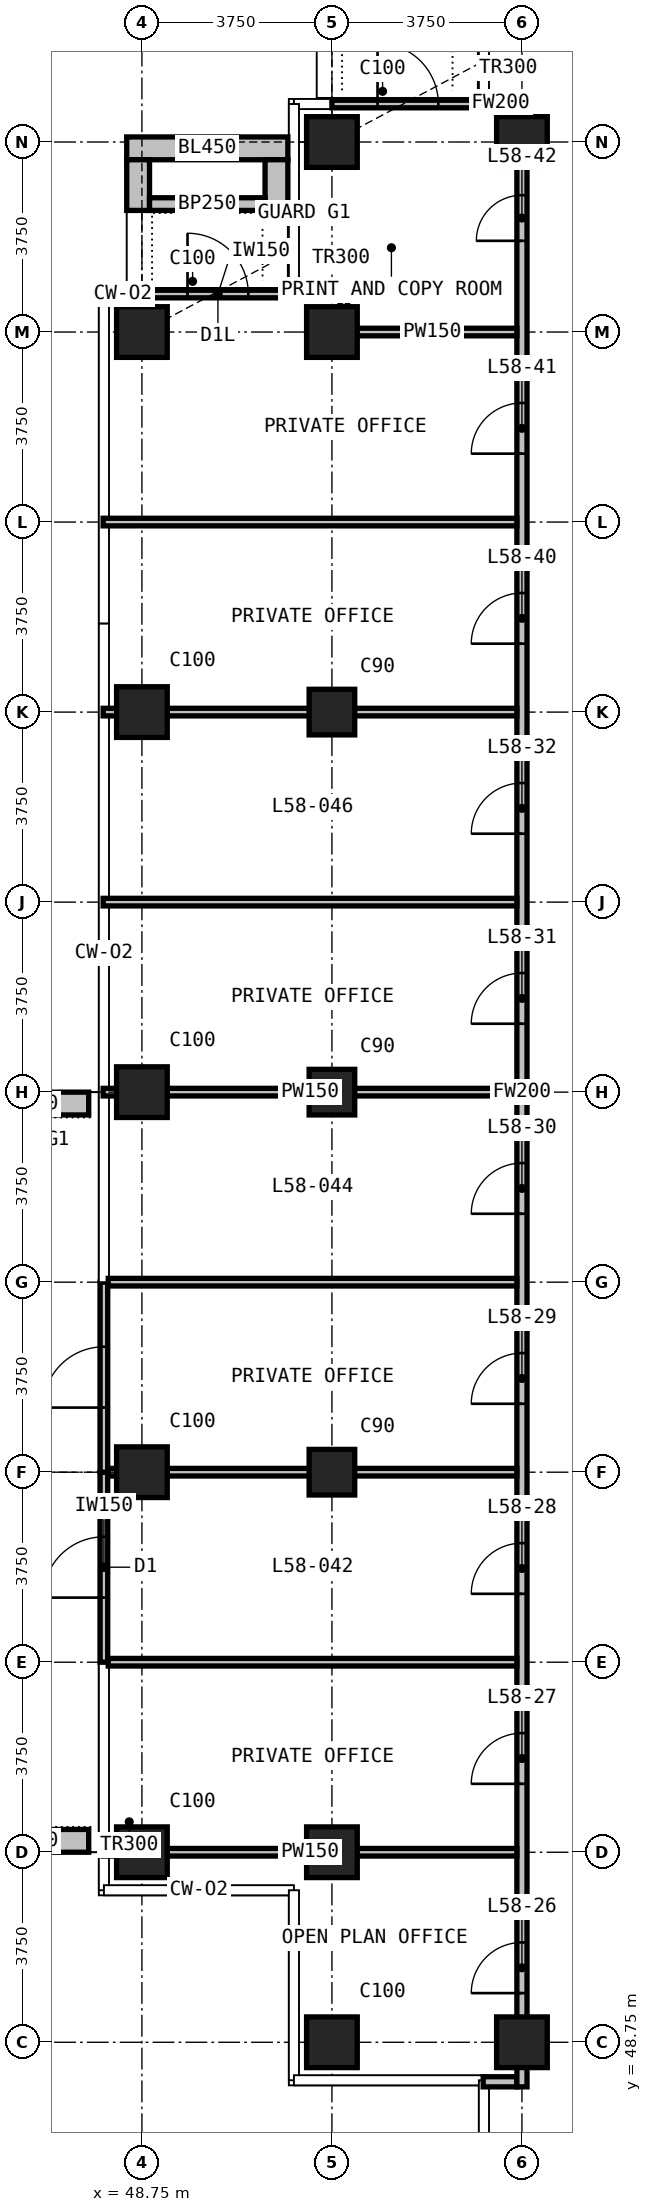
"""IFC4 building model, lengths in metres.
Left out: names, types, materials, properties, quantities, classifications, styles, units other than length and angle.
Written with IfcOpenShell. Run it as: python <this file> out.ifc"""

import sys

from ifc_helpers import new_model, si_unit, direction, frame, frame_2d, origin, origin_2d, place, context, subcontext, project, spatial, rectangle, extrude, element, fill, save


model = new_model("IFC4")
c1 = context("Model", 3, precision=1e-05, world=origin(), true_north=direction((0.0, 1.0)))
c2 = subcontext(c1, "Body", "Model", "MODEL_VIEW")
j1 = project(units=[si_unit("LENGTHUNIT", "METRE"), si_unit("PLANEANGLEUNIT", "RADIAN")], contexts=[c1])
p1 = place(None, origin())
s1 = spatial("IfcSite", under=j1, at=p1, CompositionType="ELEMENT")
p2 = place(p1, origin())
s2 = spatial("IfcBuilding", under=s1, at=p2, CompositionType="ELEMENT")
p3 = place(p2, frame((0.0, 0.0, 224.7)))
s3 = spatial("IfcBuildingStorey", under=s2, at=p3, CompositionType="ELEMENT", Elevation=224.7)
for number, where, z_axis, x_axis in (
    (1, (48.75, 52.5, 0.0), (0.0, 0.0, 1.0), (1.0, 0.0, 0.0)),
    (2, (48.75, 60.0, 0.0), (0.0, 0.0, 1.0), (1.0, 0.0, 0.0)),
    (3, (48.75, 67.5, 0.0), (0.0, 0.0, 1.0), (1.0, 0.0, 0.0)),
    (4, (48.75, 75.0, 0.0), (0.0, 0.0, 1.0), (1.0, 0.0, 0.0)),
    (5, (48.75, 82.5, 0.0), (0.0, 0.0, 1.0), (1.0, 0.0, 0.0)),
    (6, (52.5, 48.75, 0.0), (0.0, 0.0, 1.0), (1.0, 0.0, 0.0)),
    (7, (52.5, 52.5, 0.0), (0.0, 0.0, 1.0), (1.0, 0.0, 0.0)),
):
    element("IfcColumn", number, at=place(p3, frame(where, z_axis=z_axis, x_axis=x_axis)), inside=s3, PredefinedType="COLUMN", context=c2, shape_type="SweptSolid", body=[
        extrude(rectangle(XDim=1.0, YDim=1.0, at=origin_2d()), origin(), (0.0, 0.0, 1.0), 3.6),
    ])
for number, where, z_axis, x_axis in (
    (8, (52.5, 60.0, 0.0), (0.0, 0.0, 1.0), (1.0, 0.0, 0.0)),
    (9, (52.5, 67.5, 0.0), (0.0, 0.0, 1.0), (1.0, 0.0, 0.0)),
    (10, (52.5, 75.0, 0.0), (0.0, 0.0, 1.0), (1.0, 0.0, 0.0)),
):
    element("IfcColumn", number, at=place(p3, frame(where, z_axis=z_axis, x_axis=x_axis)), inside=s3, PredefinedType="COLUMN", context=c2, shape_type="SweptSolid", body=[
        extrude(rectangle(XDim=0.9, YDim=0.9, at=origin_2d()), origin(), (0.0, 0.0, 1.0), 3.6),
    ])
for number, where, z_axis, x_axis in (
    (11, (52.5, 82.5, 0.0), (0.0, 0.0, 1.0), (1.0, 0.0, 0.0)),
    (12, (52.5, 86.25, 0.0), (0.0, 0.0, 1.0), (1.0, 0.0, 0.0)),
    (13, (56.25, 48.75, 0.0), (0.0, 0.0, 1.0), (1.0, 0.0, 0.0)),
    (14, (56.25, 86.25, 0.0), (0.0, 0.0, 1.0), (1.0, 0.0, 0.0)),
):
    element("IfcColumn", number, at=place(p3, frame(where, z_axis=z_axis, x_axis=x_axis)), inside=s3, PredefinedType="COLUMN", context=c2, shape_type="SweptSolid", body=[
        extrude(rectangle(XDim=1.0, YDim=1.0, at=origin_2d()), origin(), (0.0, 0.0, 1.0), 3.6),
    ])
p4 = place(p3, frame((52.5, 87.0, 0.0), z_axis=(0.0, 0.0, 1.0), x_axis=(1.0, 0.0, 0.0)))
e15 = element("IfcWall", 15, at=p4, inside=s3, PredefinedType="SOLIDWALL", context=c2, shape_type="SweptSolid", body=[
    extrude(rectangle(XDim=3.0, YDim=0.15, at=frame_2d((1.5, 0.0))), origin(), (0.0, 0.0, 1.0), 3.3),
])
p5 = place(p4, frame((0.9, 0.0, 0.0)))
e16 = element("IfcOpeningElement", 16, at=p5, cuts=e15, PredefinedType="OPENING", context=c2, shape_type="SweptSolid", body=[
    extrude(rectangle(XDim=1.2, YDim=2.0, at=frame_2d((0.6, 1.0))), frame((0.0, 0.085, 0.0), z_axis=(0.0, -1.0, 0.0), x_axis=(1.0, 0.0, 0.0)), (0.0, 0.0, 1.0), 0.17),
])
p6 = place(p3, frame((48.75, 83.25, 0.0), z_axis=(0.0, 0.0, 1.0), x_axis=(1.0, 0.0, 0.0)))
e17 = element("IfcWall", 17, at=p6, inside=s3, PredefinedType="SOLIDWALL", context=c2, shape_type="SweptSolid", body=[
    extrude(rectangle(XDim=3.0, YDim=0.15, at=frame_2d((1.5, 0.0))), origin(), (0.0, 0.0, 1.0), 3.3),
])
p7 = place(p6, frame((0.9, 0.0, 0.0)))
e18 = element("IfcOpeningElement", 18, at=p7, cuts=e17, PredefinedType="OPENING", context=c2, shape_type="SweptSolid", body=[
    extrude(rectangle(XDim=1.2, YDim=2.0, at=frame_2d((0.6, 1.0))), frame((0.0, 0.085, 0.0), z_axis=(0.0, -1.0, 0.0), x_axis=(1.0, 0.0, 0.0)), (0.0, 0.0, 1.0), 0.17),
])
p8 = place(p3, frame((48.0, 56.25, 0.0), z_axis=(0.0, 0.0, 1.0), x_axis=(0.0, 1.0, 0.0)))
e19 = element("IfcWall", 19, at=p8, inside=s3, PredefinedType="SOLIDWALL", context=c2, shape_type="SweptSolid", body=[
    extrude(rectangle(XDim=3.75, YDim=0.15, at=frame_2d((1.875, 0.0))), origin(), (0.0, 0.0, 1.0), 3.3),
])
p9 = place(p8, frame((1.275, 0.0, 0.0)))
e20 = element("IfcOpeningElement", 20, at=p9, cuts=e19, PredefinedType="OPENING", context=c2, shape_type="SweptSolid", body=[
    extrude(rectangle(XDim=1.2, YDim=2.4, at=frame_2d((0.6, 1.2))), frame((0.0, 0.085, 0.0), z_axis=(0.0, -1.0, 0.0), x_axis=(1.0, 0.0, 0.0)), (0.0, 0.0, 1.0), 0.17),
])
p10 = place(p3, frame((48.0, 60.0, 0.0), z_axis=(0.0, 0.0, 1.0), x_axis=(0.0, 1.0, 0.0)))
e21 = element("IfcWall", 21, at=p10, inside=s3, PredefinedType="SOLIDWALL", context=c2, shape_type="SweptSolid", body=[
    extrude(rectangle(XDim=3.75, YDim=0.15, at=frame_2d((1.875, 0.0))), origin(), (0.0, 0.0, 1.0), 3.3),
])
p11 = place(p10, frame((1.275, 0.0, 0.0)))
e22 = element("IfcOpeningElement", 22, at=p11, cuts=e21, PredefinedType="OPENING", context=c2, shape_type="SweptSolid", body=[
    extrude(rectangle(XDim=1.2, YDim=2.4, at=frame_2d((0.6, 1.2))), frame((0.0, 0.085, 0.0), z_axis=(0.0, -1.0, 0.0), x_axis=(1.0, 0.0, 0.0)), (0.0, 0.0, 1.0), 0.17),
])
p12 = place(p3, frame((48.45, 86.125, 0.0), z_axis=(0.0, 0.0, 1.0), x_axis=(1.0, 0.0, 0.0)))
e23 = element("IfcWall", 23, at=p12, inside=s3, PredefinedType="USERDEFINED", context=c2, shape_type="SweptSolid", body=[
    extrude(rectangle(XDim=3.18, YDim=0.45, at=frame_2d((1.59, 0.0))), origin(), (0.0, 0.0, 1.0), 1.1),
])
for number, where, z_axis, x_axis in (
    (24, (48.675, 84.9, 0.0), (0.0, 0.0, 1.0), (0.0, 1.0, 0.0)),
    (25, (51.405, 84.9, 0.0), (0.0, 0.0, 1.0), (0.0, 1.0, 0.0)),
):
    element("IfcWall", number, at=place(p3, frame(where, z_axis=z_axis, x_axis=x_axis)), inside=s3, PredefinedType="USERDEFINED", context=c2, shape_type="SweptSolid", body=[
        extrude(rectangle(XDim=1.0, YDim=0.45, at=frame_2d((0.5, 0.0))), origin(), (0.0, 0.0, 1.0), 1.1),
    ])
p13 = place(p3, frame((48.9, 85.025, 0.0), z_axis=(0.0, 0.0, 1.0), x_axis=(1.0, 0.0, 0.0)))
e26 = element("IfcWall", 26, at=p13, inside=s3, PredefinedType="USERDEFINED", context=c2, shape_type="SweptSolid", body=[
    extrude(rectangle(XDim=2.28, YDim=0.25, at=frame_2d((1.14, 0.0))), origin(), (0.0, 0.0, 1.0), 1.0),
])
for number, where, z_axis, x_axis in (
    (27, (47.7, 52.725, 0.0), (0.0, 0.0, 1.0), (-1.0, 0.0, 0.0)),
    (28, (47.7, 67.275, 0.0), (0.0, 0.0, 1.0), (-1.0, 0.0, 0.0)),
):
    element("IfcWall", number, at=place(p3, frame(where, z_axis=z_axis, x_axis=x_axis)), inside=s3, PredefinedType="USERDEFINED", context=c2, shape_type="SweptSolid", body=[
        extrude(rectangle(XDim=2.35, YDim=0.45, at=frame_2d((1.175, 0.0))), origin(), (0.0, 0.0, 1.0), 1.1),
    ])
p14 = place(p3, frame((55.485, 47.97, 0.0), z_axis=(0.0, 0.0, 1.0), x_axis=(1.0, 0.0, 0.0)))
e29 = element("IfcWall", 29, at=p14, inside=s3, PredefinedType="PARTITIONING", context=c2, shape_type="SweptSolid", body=[
    extrude(rectangle(XDim=0.665, YDim=0.2, at=frame_2d((0.333, 0.0))), origin(), (0.0, 0.0, 1.0), 3.3),
])
p15 = place(p3, frame((55.51, 87.03, 0.0), z_axis=(0.0, 0.0, 1.0), x_axis=(1.0, 0.0, 0.0)))
e30 = element("IfcWall", 30, at=p15, inside=s3, PredefinedType="PARTITIONING", context=c2, shape_type="SweptSolid", body=[
    extrude(rectangle(XDim=0.64, YDim=0.2, at=frame_2d((0.32, 0.0))), origin(), (0.0, 0.0, 1.0), 3.3),
])
p16 = place(p3, frame((56.25, 47.87, 0.0), z_axis=(0.0, 0.0, 1.0), x_axis=(0.0, 1.0, 0.0)))
e31 = element("IfcWall", 31, at=p16, inside=s3, PredefinedType="PARTITIONING", context=c2, shape_type="SweptSolid", body=[
    extrude(rectangle(XDim=39.26, YDim=0.2, at=frame_2d((19.63, 0.0))), origin(), (0.0, 0.0, 1.0), 3.3),
])
p17 = place(p16, frame((1.85, 0.0, 0.0)))
e32 = element("IfcOpeningElement", 32, at=p17, cuts=e31, PredefinedType="OPENING", context=c2, shape_type="SweptSolid", body=[
    extrude(rectangle(XDim=1.0, YDim=2.2, at=frame_2d((0.5, 1.1))), frame((0.0, 0.11, 0.0), z_axis=(0.0, -1.0, 0.0), x_axis=(1.0, 0.0, 0.0)), (0.0, 0.0, 1.0), 0.22),
])
p18 = place(p16, frame((5.98, 0.0, 0.0)))
e33 = element("IfcOpeningElement", 33, at=p18, cuts=e31, PredefinedType="OPENING", context=c2, shape_type="SweptSolid", body=[
    extrude(rectangle(XDim=1.0, YDim=2.2, at=frame_2d((0.5, 1.1))), frame((0.0, 0.11, 0.0), z_axis=(0.0, -1.0, 0.0), x_axis=(1.0, 0.0, 0.0)), (0.0, 0.0, 1.0), 0.22),
])
p19 = place(p16, frame((9.73, 0.0, 0.0)))
e34 = element("IfcOpeningElement", 34, at=p19, cuts=e31, PredefinedType="OPENING", context=c2, shape_type="SweptSolid", body=[
    extrude(rectangle(XDim=1.0, YDim=2.2, at=frame_2d((0.5, 1.1))), frame((0.0, 0.11, 0.0), z_axis=(0.0, -1.0, 0.0), x_axis=(1.0, 0.0, 0.0)), (0.0, 0.0, 1.0), 0.22),
])
p20 = place(p16, frame((13.48, 0.0, 0.0)))
e35 = element("IfcOpeningElement", 35, at=p20, cuts=e31, PredefinedType="OPENING", context=c2, shape_type="SweptSolid", body=[
    extrude(rectangle(XDim=1.0, YDim=2.2, at=frame_2d((0.5, 1.1))), frame((0.0, 0.11, 0.0), z_axis=(0.0, -1.0, 0.0), x_axis=(1.0, 0.0, 0.0)), (0.0, 0.0, 1.0), 0.22),
])
p21 = place(p16, frame((17.23, 0.0, 0.0)))
e36 = element("IfcOpeningElement", 36, at=p21, cuts=e31, PredefinedType="OPENING", context=c2, shape_type="SweptSolid", body=[
    extrude(rectangle(XDim=1.0, YDim=2.2, at=frame_2d((0.5, 1.1))), frame((0.0, 0.11, 0.0), z_axis=(0.0, -1.0, 0.0), x_axis=(1.0, 0.0, 0.0)), (0.0, 0.0, 1.0), 0.22),
])
p22 = place(p16, frame((20.98, 0.0, 0.0)))
e37 = element("IfcOpeningElement", 37, at=p22, cuts=e31, PredefinedType="OPENING", context=c2, shape_type="SweptSolid", body=[
    extrude(rectangle(XDim=1.0, YDim=2.2, at=frame_2d((0.5, 1.1))), frame((0.0, 0.11, 0.0), z_axis=(0.0, -1.0, 0.0), x_axis=(1.0, 0.0, 0.0)), (0.0, 0.0, 1.0), 0.22),
])
p23 = place(p16, frame((24.73, 0.0, 0.0)))
e38 = element("IfcOpeningElement", 38, at=p23, cuts=e31, PredefinedType="OPENING", context=c2, shape_type="SweptSolid", body=[
    extrude(rectangle(XDim=1.0, YDim=2.2, at=frame_2d((0.5, 1.1))), frame((0.0, 0.11, 0.0), z_axis=(0.0, -1.0, 0.0), x_axis=(1.0, 0.0, 0.0)), (0.0, 0.0, 1.0), 0.22),
])
p24 = place(p16, frame((28.48, 0.0, 0.0)))
e39 = element("IfcOpeningElement", 39, at=p24, cuts=e31, PredefinedType="OPENING", context=c2, shape_type="SweptSolid", body=[
    extrude(rectangle(XDim=1.0, YDim=2.2, at=frame_2d((0.5, 1.1))), frame((0.0, 0.11, 0.0), z_axis=(0.0, -1.0, 0.0), x_axis=(1.0, 0.0, 0.0)), (0.0, 0.0, 1.0), 0.22),
])
p25 = place(p16, frame((32.23, 0.0, 0.0)))
e40 = element("IfcOpeningElement", 40, at=p25, cuts=e31, PredefinedType="OPENING", context=c2, shape_type="SweptSolid", body=[
    extrude(rectangle(XDim=1.0, YDim=2.2, at=frame_2d((0.5, 1.1))), frame((0.0, 0.11, 0.0), z_axis=(0.0, -1.0, 0.0), x_axis=(1.0, 0.0, 0.0)), (0.0, 0.0, 1.0), 0.22),
])
p26 = place(p16, frame((36.43, 0.0, 0.0)))
e41 = element("IfcOpeningElement", 41, at=p26, cuts=e31, PredefinedType="OPENING", context=c2, shape_type="SweptSolid", body=[
    extrude(rectangle(XDim=0.9, YDim=2.2, at=frame_2d((0.45, 1.1))), frame((0.0, 0.11, 0.0), z_axis=(0.0, -1.0, 0.0), x_axis=(1.0, 0.0, 0.0)), (0.0, 0.0, 1.0), 0.22),
])
p27 = place(p3, frame((47.985, 52.5, 0.0), z_axis=(0.0, 0.0, 1.0), x_axis=(1.0, 0.0, 0.0)))
e42 = element("IfcWall", 42, at=p27, inside=s3, PredefinedType="PARTITIONING", context=c2, shape_type="SweptSolid", body=[
    extrude(rectangle(XDim=8.165, YDim=0.15, at=frame_2d((4.083, 0.0))), origin(), (0.0, 0.0, 1.0), 3.3),
])
for number, where, z_axis, x_axis in (
    (43, (48.085, 56.25, 0.0), (0.0, 0.0, 1.0), (1.0, 0.0, 0.0)),
    (44, (48.085, 60.0, 0.0), (0.0, 0.0, 1.0), (1.0, 0.0, 0.0)),
    (45, (48.085, 63.75, 0.0), (0.0, 0.0, 1.0), (1.0, 0.0, 0.0)),
):
    element("IfcWall", number, at=place(p3, frame(where, z_axis=z_axis, x_axis=x_axis)), inside=s3, PredefinedType="PARTITIONING", context=c2, shape_type="SweptSolid", body=[
        extrude(rectangle(XDim=8.065, YDim=0.15, at=frame_2d((4.032, 0.0))), origin(), (0.0, 0.0, 1.0), 3.3),
    ])
for number, where, z_axis, x_axis in (
    (46, (47.985, 67.5, 0.0), (0.0, 0.0, 1.0), (1.0, 0.0, 0.0)),
    (47, (47.985, 71.25, 0.0), (0.0, 0.0, 1.0), (1.0, 0.0, 0.0)),
    (48, (47.985, 75.0, 0.0), (0.0, 0.0, 1.0), (1.0, 0.0, 0.0)),
    (49, (47.985, 78.75, 0.0), (0.0, 0.0, 1.0), (1.0, 0.0, 0.0)),
):
    element("IfcWall", number, at=place(p3, frame(where, z_axis=z_axis, x_axis=x_axis)), inside=s3, PredefinedType="PARTITIONING", context=c2, shape_type="SweptSolid", body=[
        extrude(rectangle(XDim=8.165, YDim=0.15, at=frame_2d((4.083, 0.0))), origin(), (0.0, 0.0, 1.0), 3.3),
    ])
p28 = place(p3, frame((52.81, 82.5, 0.0), z_axis=(0.0, 0.0, 1.0), x_axis=(1.0, 0.0, 0.0)))
e50 = element("IfcWall", 50, at=p28, inside=s3, PredefinedType="PARTITIONING", context=c2, shape_type="SweptSolid", body=[
    extrude(rectangle(XDim=3.34, YDim=0.15, at=frame_2d((1.67, 0.0))), origin(), (0.0, 0.0, 1.0), 3.3),
])
p29 = place(p3, frame((51.76, 83.265, 0.0), z_axis=(0.0, 0.0, 1.0), x_axis=(1.0, 0.0, 0.0)))
e51 = element("IfcWall", 51, at=p29, inside=s3, PredefinedType="PARTITIONING", context=c2, shape_type="SweptSolid", body=[
    extrude(rectangle(XDim=0.9, YDim=0.15, at=frame_2d((0.45, 0.0))), origin(), (0.0, 0.0, 1.0), 3.3),
])
p30 = place(p3, frame((52.735, 82.425, 0.0), z_axis=(0.0, 0.0, 1.0), x_axis=(0.0, 1.0, 0.0)))
e52 = element("IfcWall", 52, at=p30, inside=s3, PredefinedType="PARTITIONING", context=c2, shape_type="SweptSolid", body=[
    extrude(rectangle(XDim=0.915, YDim=0.15, at=frame_2d((0.458, 0.0))), origin(), (0.0, 0.0, 1.0), 3.3),
])
p31 = place(p5, origin())
e53 = element("IfcDoor", 53, at=p31, inside=s3, OperationType="SINGLE_SWING_LEFT", PredefinedType="DOOR", context=c2, shape_type="SweptSolid", body=[
    extrude(rectangle(XDim=1.2, YDim=2.0, at=frame_2d((0.6, 1.0))), frame((0.0, 0.025, 0.0), z_axis=(0.0, -1.0, 0.0), x_axis=(1.0, 0.0, 0.0)), (0.0, 0.0, 1.0), 0.05),
])
fill(e16, e53)
p32 = place(p7, origin())
e54 = element("IfcDoor", 54, at=p32, inside=s3, OperationType="SINGLE_SWING_LEFT", PredefinedType="DOOR", context=c2, shape_type="SweptSolid", body=[
    extrude(rectangle(XDim=1.2, YDim=2.0, at=frame_2d((0.6, 1.0))), frame((0.0, 0.025, 0.0), z_axis=(0.0, -1.0, 0.0), x_axis=(1.0, 0.0, 0.0)), (0.0, 0.0, 1.0), 0.05),
])
fill(e18, e54)
p33 = place(p9, origin())
e55 = element("IfcDoor", 55, at=p33, inside=s3, OperationType="SINGLE_SWING_LEFT", PredefinedType="DOOR", context=c2, shape_type="SweptSolid", body=[
    extrude(rectangle(XDim=1.2, YDim=2.4, at=frame_2d((0.6, 1.2))), frame((0.0, 0.025, 0.0), z_axis=(0.0, -1.0, 0.0), x_axis=(1.0, 0.0, 0.0)), (0.0, 0.0, 1.0), 0.05),
])
fill(e20, e55)
p34 = place(p11, origin())
e56 = element("IfcDoor", 56, at=p34, inside=s3, OperationType="SINGLE_SWING_LEFT", PredefinedType="DOOR", context=c2, shape_type="SweptSolid", body=[
    extrude(rectangle(XDim=1.2, YDim=2.4, at=frame_2d((0.6, 1.2))), frame((0.0, 0.025, 0.0), z_axis=(0.0, -1.0, 0.0), x_axis=(1.0, 0.0, 0.0)), (0.0, 0.0, 1.0), 0.05),
])
fill(e22, e56)
p35 = place(p17, origin())
e57 = element("IfcDoor", 57, at=p35, inside=s3, OperationType="SINGLE_SWING_LEFT", PredefinedType="DOOR", context=c2, shape_type="SweptSolid", body=[
    extrude(rectangle(XDim=1.0, YDim=2.2, at=frame_2d((0.5, 1.1))), frame((0.0, 0.025, 0.0), z_axis=(0.0, -1.0, 0.0), x_axis=(1.0, 0.0, 0.0)), (0.0, 0.0, 1.0), 0.05),
])
fill(e32, e57)
p36 = place(p18, origin())
e58 = element("IfcDoor", 58, at=p36, inside=s3, OperationType="SINGLE_SWING_LEFT", PredefinedType="DOOR", context=c2, shape_type="SweptSolid", body=[
    extrude(rectangle(XDim=1.0, YDim=2.2, at=frame_2d((0.5, 1.1))), frame((0.0, 0.025, 0.0), z_axis=(0.0, -1.0, 0.0), x_axis=(1.0, 0.0, 0.0)), (0.0, 0.0, 1.0), 0.05),
])
fill(e33, e58)
p37 = place(p19, origin())
e59 = element("IfcDoor", 59, at=p37, inside=s3, OperationType="SINGLE_SWING_LEFT", PredefinedType="DOOR", context=c2, shape_type="SweptSolid", body=[
    extrude(rectangle(XDim=1.0, YDim=2.2, at=frame_2d((0.5, 1.1))), frame((0.0, 0.025, 0.0), z_axis=(0.0, -1.0, 0.0), x_axis=(1.0, 0.0, 0.0)), (0.0, 0.0, 1.0), 0.05),
])
fill(e34, e59)
p38 = place(p20, origin())
e60 = element("IfcDoor", 60, at=p38, inside=s3, OperationType="SINGLE_SWING_LEFT", PredefinedType="DOOR", context=c2, shape_type="SweptSolid", body=[
    extrude(rectangle(XDim=1.0, YDim=2.2, at=frame_2d((0.5, 1.1))), frame((0.0, 0.025, 0.0), z_axis=(0.0, -1.0, 0.0), x_axis=(1.0, 0.0, 0.0)), (0.0, 0.0, 1.0), 0.05),
])
fill(e35, e60)
p39 = place(p21, origin())
e61 = element("IfcDoor", 61, at=p39, inside=s3, OperationType="SINGLE_SWING_LEFT", PredefinedType="DOOR", context=c2, shape_type="SweptSolid", body=[
    extrude(rectangle(XDim=1.0, YDim=2.2, at=frame_2d((0.5, 1.1))), frame((0.0, 0.025, 0.0), z_axis=(0.0, -1.0, 0.0), x_axis=(1.0, 0.0, 0.0)), (0.0, 0.0, 1.0), 0.05),
])
fill(e36, e61)
p40 = place(p22, origin())
e62 = element("IfcDoor", 62, at=p40, inside=s3, OperationType="SINGLE_SWING_LEFT", PredefinedType="DOOR", context=c2, shape_type="SweptSolid", body=[
    extrude(rectangle(XDim=1.0, YDim=2.2, at=frame_2d((0.5, 1.1))), frame((0.0, 0.025, 0.0), z_axis=(0.0, -1.0, 0.0), x_axis=(1.0, 0.0, 0.0)), (0.0, 0.0, 1.0), 0.05),
])
fill(e37, e62)
p41 = place(p23, origin())
e63 = element("IfcDoor", 63, at=p41, inside=s3, OperationType="SINGLE_SWING_LEFT", PredefinedType="DOOR", context=c2, shape_type="SweptSolid", body=[
    extrude(rectangle(XDim=1.0, YDim=2.2, at=frame_2d((0.5, 1.1))), frame((0.0, 0.025, 0.0), z_axis=(0.0, -1.0, 0.0), x_axis=(1.0, 0.0, 0.0)), (0.0, 0.0, 1.0), 0.05),
])
fill(e38, e63)
p42 = place(p24, origin())
e64 = element("IfcDoor", 64, at=p42, inside=s3, OperationType="SINGLE_SWING_LEFT", PredefinedType="DOOR", context=c2, shape_type="SweptSolid", body=[
    extrude(rectangle(XDim=1.0, YDim=2.2, at=frame_2d((0.5, 1.1))), frame((0.0, 0.025, 0.0), z_axis=(0.0, -1.0, 0.0), x_axis=(1.0, 0.0, 0.0)), (0.0, 0.0, 1.0), 0.05),
])
fill(e39, e64)
p43 = place(p25, origin())
e65 = element("IfcDoor", 65, at=p43, inside=s3, OperationType="SINGLE_SWING_RIGHT", PredefinedType="DOOR", context=c2, shape_type="SweptSolid", body=[
    extrude(rectangle(XDim=1.0, YDim=2.2, at=frame_2d((0.5, 1.1))), frame((0.0, 0.025, 0.0), z_axis=(0.0, -1.0, 0.0), x_axis=(1.0, 0.0, 0.0)), (0.0, 0.0, 1.0), 0.05),
])
fill(e40, e65)
p44 = place(p26, origin())
e66 = element("IfcDoor", 66, at=p44, inside=s3, OperationType="SINGLE_SWING_RIGHT", PredefinedType="DOOR", context=c2, shape_type="SweptSolid", body=[
    extrude(rectangle(XDim=0.9, YDim=2.2, at=frame_2d((0.45, 1.1))), frame((0.0, 0.025, 0.0), z_axis=(0.0, -1.0, 0.0), x_axis=(1.0, 0.0, 0.0)), (0.0, 0.0, 1.0), 0.05),
])
fill(e41, e66)
save(model, sys.argv[1])
